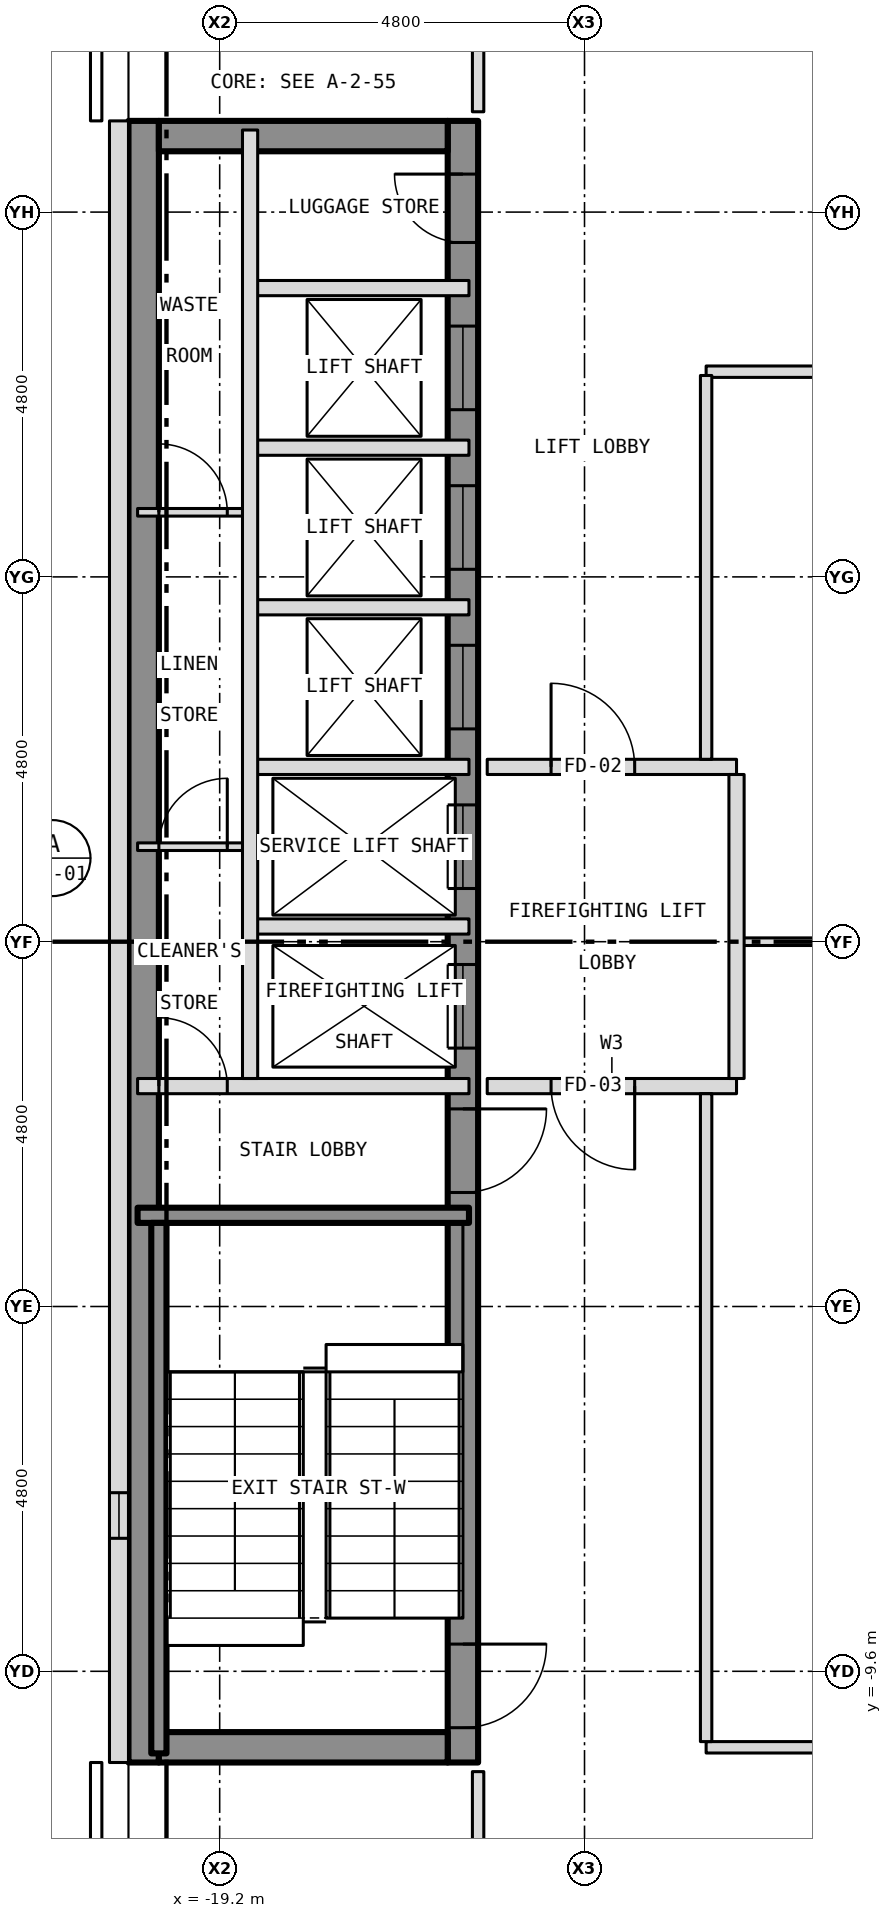
"""IFC4 building model, lengths in metres.
Left out: names, types, materials, properties, quantities, classifications, styles, units other than length and angle.
Written with IfcOpenShell. Run it as: python <this file> out.ifc"""

import sys

from ifc_helpers import new_model, si_unit, direction, frame, frame_2d, origin, place, context, subcontext, project, spatial, rectangle, extrude, element, fill, save


model = new_model("IFC4")
c1 = context("Model", 3, precision=1e-05, world=origin(), true_north=direction((0.0, 1.0)))
c2 = subcontext(c1, "Body", "Model", "MODEL_VIEW")
j1 = project(units=[si_unit("LENGTHUNIT", "METRE"), si_unit("PLANEANGLEUNIT", "RADIAN")], contexts=[c1])
p1 = place(None, origin())
s1 = spatial("IfcSite", under=j1, at=p1, CompositionType="ELEMENT")
p2 = place(p1, origin())
s2 = spatial("IfcBuilding", under=s1, at=p2, CompositionType="ELEMENT")
p3 = place(p2, frame((0.0, 0.0, 201.5)))
s3 = spatial("IfcBuildingStorey", under=s2, at=p3, CompositionType="ELEMENT", Elevation=201.5)
p4 = place(p3, frame((-16.0, -10.8, 0.0), z_axis=(0.0, 0.0, 1.0), x_axis=(0.0, 1.0, 0.0)))
e1 = element("IfcWall", 1, at=p4, inside=s3, PredefinedType="SHEAR", context=c2, shape_type="SweptSolid", body=[
    extrude(rectangle(XDim=21.6, YDim=0.4, at=frame_2d((10.8, 0.0))), origin(), (0.0, 0.0, 1.0), 3.25),
])
p5 = place(p4, frame((9.4, 0.0, 0.0)))
e2 = element("IfcOpeningElement", 2, at=p5, cuts=e1, PredefinedType="OPENING", context=c2, shape_type="SweptSolid", body=[
    extrude(rectangle(XDim=1.1, YDim=2.1, at=frame_2d((0.55, 1.05))), frame((0.0, 0.212, 0.0), z_axis=(0.0, -1.0, 0.0), x_axis=(1.0, 0.0, 0.0)), (0.0, 0.0, 1.0), 0.424),
])
p6 = place(p4, frame((11.5, 0.0, 0.0)))
e3 = element("IfcOpeningElement", 3, at=p6, cuts=e1, PredefinedType="OPENING", context=c2, shape_type="SweptSolid", body=[
    extrude(rectangle(XDim=1.1, YDim=2.1, at=frame_2d((0.55, 1.05))), frame((0.0, 0.212, 0.0), z_axis=(0.0, -1.0, 0.0), x_axis=(1.0, 0.0, 0.0)), (0.0, 0.0, 1.0), 0.424),
])
p7 = place(p4, frame((13.6, 0.0, 0.0)))
e4 = element("IfcOpeningElement", 4, at=p7, cuts=e1, PredefinedType="OPENING", context=c2, shape_type="SweptSolid", body=[
    extrude(rectangle(XDim=1.1, YDim=2.1, at=frame_2d((0.55, 1.05))), frame((0.0, 0.212, 0.0), z_axis=(0.0, -1.0, 0.0), x_axis=(1.0, 0.0, 0.0)), (0.0, 0.0, 1.0), 0.424),
])
p8 = place(p4, frame((15.7, 0.0, 0.0)))
e5 = element("IfcOpeningElement", 5, at=p8, cuts=e1, PredefinedType="OPENING", context=c2, shape_type="SweptSolid", body=[
    extrude(rectangle(XDim=1.1, YDim=2.1, at=frame_2d((0.55, 1.05))), frame((0.0, 0.212, 0.0), z_axis=(0.0, -1.0, 0.0), x_axis=(1.0, 0.0, 0.0)), (0.0, 0.0, 1.0), 0.424),
])
p9 = place(p4, frame((17.8, 0.0, 0.0)))
e6 = element("IfcOpeningElement", 6, at=p9, cuts=e1, PredefinedType="OPENING", context=c2, shape_type="SweptSolid", body=[
    extrude(rectangle(XDim=1.1, YDim=2.1, at=frame_2d((0.55, 1.05))), frame((0.0, 0.212, 0.0), z_axis=(0.0, -1.0, 0.0), x_axis=(1.0, 0.0, 0.0)), (0.0, 0.0, 1.0), 0.424),
])
p10 = place(p4, frame((0.458, 0.0, 0.0)))
e7 = element("IfcOpeningElement", 7, at=p10, cuts=e1, PredefinedType="OPENING", context=c2, shape_type="SweptSolid", body=[
    extrude(rectangle(XDim=1.1, YDim=2.1, at=frame_2d((0.55, 1.05))), frame((0.0, 0.212, 0.0), z_axis=(0.0, -1.0, 0.0), x_axis=(1.0, 0.0, 0.0)), (0.0, 0.0, 1.0), 0.424),
])
p11 = place(p4, frame((7.5, 0.0, 0.0)))
e8 = element("IfcOpeningElement", 8, at=p11, cuts=e1, PredefinedType="OPENING", context=c2, shape_type="SweptSolid", body=[
    extrude(rectangle(XDim=1.1, YDim=2.1, at=frame_2d((0.55, 1.05))), frame((0.0, 0.212, 0.0), z_axis=(0.0, -1.0, 0.0), x_axis=(1.0, 0.0, 0.0)), (0.0, 0.0, 1.0), 0.424),
])
p12 = place(p4, frame((20.0, 0.0, 0.0)))
e9 = element("IfcOpeningElement", 9, at=p12, cuts=e1, PredefinedType="OPENING", context=c2, shape_type="SweptSolid", body=[
    extrude(rectangle(XDim=0.9, YDim=2.1, at=frame_2d((0.45, 1.05))), frame((0.0, 0.212, 0.0), z_axis=(0.0, -1.0, 0.0), x_axis=(1.0, 0.0, 0.0)), (0.0, 0.0, 1.0), 0.424),
])
p13 = place(p3, frame((-20.2, -10.8, 0.0), z_axis=(0.0, 0.0, 1.0), x_axis=(0.0, 1.0, 0.0)))
e10 = element("IfcWall", 10, at=p13, inside=s3, PredefinedType="SHEAR", context=c2, shape_type="SweptSolid", body=[
    extrude(rectangle(XDim=21.6, YDim=0.4, at=frame_2d((10.8, 0.0))), origin(), (0.0, 0.0, 1.0), 3.25),
])
for number, where, z_axis, x_axis in (
    (11, (-20.0, 10.6, 0.0), (0.0, 0.0, 1.0), (1.0, 0.0, 0.0)),
    (12, (-20.0, -10.6, 0.0), (0.0, 0.0, 1.0), (1.0, 0.0, 0.0)),
):
    element("IfcWall", number, at=place(p3, frame(where, z_axis=z_axis, x_axis=x_axis)), inside=s3, PredefinedType="SHEAR", context=c2, shape_type="SweptSolid", body=[
        extrude(rectangle(XDim=3.8, YDim=0.4, at=frame_2d((1.9, 0.0))), origin(), (0.0, 0.0, 1.0), 3.25),
    ])
p14 = place(p3, frame((-20.525, 10.8, 0.0), z_axis=(0.0, 0.0, 1.0), x_axis=(0.0, -1.0, 0.0)))
e13 = element("IfcWall", 13, at=p14, inside=s3, PredefinedType="SOLIDWALL", context=c2, shape_type="SweptSolid", body=[
    extrude(rectangle(XDim=21.6, YDim=0.25, at=frame_2d((10.8, 0.0))), origin(), (0.0, 0.0, 1.0), 3.5),
])
p15 = place(p14, frame((18.05, 0.0, 1.0)))
e14 = element("IfcOpeningElement", 14, at=p15, cuts=e13, PredefinedType="OPENING", context=c2, shape_type="SweptSolid", body=[
    extrude(rectangle(XDim=0.6, YDim=1.5, at=frame_2d((0.3, 0.75))), frame((0.0, 0.137, 0.0), z_axis=(0.0, -1.0, 0.0), x_axis=(1.0, 0.0, 0.0)), (0.0, 0.0, 1.0), 0.274),
])
p16 = place(p3, frame((-12.8, -10.6, 0.0), z_axis=(0.0, 0.0, 1.0), x_axis=(1.0, 0.0, 0.0)))
e15 = element("IfcWall", 15, at=p16, inside=s3, PredefinedType="PARTITIONING", context=c2, shape_type="SweptSolid", body=[
    extrude(rectangle(XDim=16.9, YDim=0.15, at=frame_2d((8.45, 0.0))), origin(), (0.0, 0.0, 1.0), 3.35),
])
p17 = place(p16, frame((5.95, 0.0, 0.0)))
e16 = element("IfcOpeningElement", 16, at=p17, cuts=e15, PredefinedType="OPENING", context=c2, shape_type="SweptSolid", body=[
    extrude(rectangle(XDim=0.9, YDim=2.1, at=frame_2d((0.45, 1.05))), frame((0.0, 0.087, 0.0), z_axis=(0.0, -1.0, 0.0), x_axis=(1.0, 0.0, 0.0)), (0.0, 0.0, 1.0), 0.174),
])
p18 = place(p3, frame((-20.28, -3.6, 0.0), z_axis=(0.0, 0.0, 1.0), x_axis=(1.0, 0.0, 0.0)))
e17 = element("IfcWall", 17, at=p18, inside=s3, PredefinedType="SHEAR", context=c2, shape_type="SweptSolid", body=[
    extrude(rectangle(XDim=4.36, YDim=0.2, at=frame_2d((2.18, 0.0))), origin(), (0.0, 0.0, 1.0), 3.25),
])
p19 = place(p3, frame((-20.28, -1.9, 0.0), z_axis=(0.0, 0.0, 1.0), x_axis=(1.0, 0.0, 0.0)))
e18 = element("IfcWall", 18, at=p19, inside=s3, PredefinedType="PARTITIONING", context=c2, shape_type="SweptSolid", body=[
    extrude(rectangle(XDim=4.36, YDim=0.2, at=frame_2d((2.18, 0.0))), origin(), (0.0, 0.0, 1.0), 3.25),
])
p20 = place(p19, frame((0.28, 0.0, 0.0)))
e19 = element("IfcOpeningElement", 19, at=p20, cuts=e18, PredefinedType="OPENING", context=c2, shape_type="SweptSolid", body=[
    extrude(rectangle(XDim=0.9, YDim=2.1, at=frame_2d((0.45, 1.05))), frame((0.0, 0.112, 0.0), z_axis=(0.0, -1.0, 0.0), x_axis=(1.0, 0.0, 0.0)), (0.0, 0.0, 1.0), 0.224),
])
p21 = place(p3, frame((-15.68, -1.9, 0.0), z_axis=(0.0, 0.0, 1.0), x_axis=(1.0, 0.0, 0.0)))
e20 = element("IfcWall", 20, at=p21, inside=s3, PredefinedType="PARTITIONING", context=c2, shape_type="SweptSolid", body=[
    extrude(rectangle(XDim=3.28, YDim=0.2, at=frame_2d((1.64, 0.0))), origin(), (0.0, 0.0, 1.0), 3.35),
])
p22 = place(p21, frame((0.84, 0.0, 0.0)))
e21 = element("IfcOpeningElement", 21, at=p22, cuts=e20, PredefinedType="OPENING", context=c2, shape_type="SweptSolid", body=[
    extrude(rectangle(XDim=1.1, YDim=2.1, at=frame_2d((0.55, 1.05))), frame((0.0, 0.112, 0.0), z_axis=(0.0, -1.0, 0.0), x_axis=(1.0, 0.0, 0.0)), (0.0, 0.0, 1.0), 0.224),
])
p23 = place(p3, frame((-12.4, 0.0, 0.0), z_axis=(0.0, 0.0, 1.0), x_axis=(1.0, 0.0, 0.0)))
e22 = element("IfcWall", 22, at=p23, inside=s3, PredefinedType="PARTITIONING", context=c2, shape_type="SweptSolid", body=[
    extrude(rectangle(XDim=2.613, YDim=0.1, at=frame_2d((1.306, 0.0))), origin(), (0.0, 0.0, 1.0), 2.728),
])
p24 = place(p3, frame((-18.8, 0.2, 0.0), z_axis=(0.0, 0.0, 1.0), x_axis=(1.0, 0.0, 0.0)))
e23 = element("IfcWall", 23, at=p24, inside=s3, PredefinedType="PARTITIONING", context=c2, shape_type="SweptSolid", body=[
    extrude(rectangle(XDim=2.88, YDim=0.2, at=frame_2d((1.44, 0.0))), origin(), (0.0, 0.0, 1.0), 3.25),
])
p25 = place(p3, frame((-20.28, 1.25, 0.0), z_axis=(0.0, 0.0, 1.0), x_axis=(1.0, 0.0, 0.0)))
e24 = element("IfcWall", 24, at=p25, inside=s3, PredefinedType="PARTITIONING", context=c2, shape_type="SweptSolid", body=[
    extrude(rectangle(XDim=1.48, YDim=0.1, at=frame_2d((0.74, 0.0))), origin(), (0.0, 0.0, 1.0), 3.25),
])
p26 = place(p25, frame((0.28, 0.0, 0.0)))
e25 = element("IfcOpeningElement", 25, at=p26, cuts=e24, PredefinedType="OPENING", context=c2, shape_type="SweptSolid", body=[
    extrude(rectangle(XDim=0.9, YDim=2.1, at=frame_2d((0.45, 1.05))), frame((0.0, 0.062, 0.0), z_axis=(0.0, -1.0, 0.0), x_axis=(1.0, 0.0, 0.0)), (0.0, 0.0, 1.0), 0.124),
])
p27 = place(p3, frame((-18.8, 2.3, 0.0), z_axis=(0.0, 0.0, 1.0), x_axis=(1.0, 0.0, 0.0)))
e26 = element("IfcWall", 26, at=p27, inside=s3, PredefinedType="PARTITIONING", context=c2, shape_type="SweptSolid", body=[
    extrude(rectangle(XDim=2.88, YDim=0.2, at=frame_2d((1.44, 0.0))), origin(), (0.0, 0.0, 1.0), 3.25),
])
p28 = place(p3, frame((-15.68, 2.3, 0.0), z_axis=(0.0, 0.0, 1.0), x_axis=(1.0, 0.0, 0.0)))
e27 = element("IfcWall", 27, at=p28, inside=s3, PredefinedType="PARTITIONING", context=c2, shape_type="SweptSolid", body=[
    extrude(rectangle(XDim=3.28, YDim=0.2, at=frame_2d((1.64, 0.0))), origin(), (0.0, 0.0, 1.0), 3.35),
])
p29 = place(p28, frame((0.84, 0.0, 0.0)))
e28 = element("IfcOpeningElement", 28, at=p29, cuts=e27, PredefinedType="OPENING", context=c2, shape_type="SweptSolid", body=[
    extrude(rectangle(XDim=1.1, YDim=2.1, at=frame_2d((0.55, 1.05))), frame((0.0, 0.112, 0.0), z_axis=(0.0, -1.0, 0.0), x_axis=(1.0, 0.0, 0.0)), (0.0, 0.0, 1.0), 0.224),
])
p30 = place(p3, frame((-18.8, 4.4, 0.0), z_axis=(0.0, 0.0, 1.0), x_axis=(1.0, 0.0, 0.0)))
e29 = element("IfcWall", 29, at=p30, inside=s3, PredefinedType="PARTITIONING", context=c2, shape_type="SweptSolid", body=[
    extrude(rectangle(XDim=2.88, YDim=0.2, at=frame_2d((1.44, 0.0))), origin(), (0.0, 0.0, 1.0), 3.25),
])
p31 = place(p3, frame((-20.28, 5.65, 0.0), z_axis=(0.0, 0.0, 1.0), x_axis=(1.0, 0.0, 0.0)))
e30 = element("IfcWall", 30, at=p31, inside=s3, PredefinedType="PARTITIONING", context=c2, shape_type="SweptSolid", body=[
    extrude(rectangle(XDim=1.48, YDim=0.1, at=frame_2d((0.74, 0.0))), origin(), (0.0, 0.0, 1.0), 3.25),
])
p32 = place(p31, frame((0.28, 0.0, 0.0)))
e31 = element("IfcOpeningElement", 31, at=p32, cuts=e30, PredefinedType="OPENING", context=c2, shape_type="SweptSolid", body=[
    extrude(rectangle(XDim=0.9, YDim=2.1, at=frame_2d((0.45, 1.05))), frame((0.0, 0.062, 0.0), z_axis=(0.0, -1.0, 0.0), x_axis=(1.0, 0.0, 0.0)), (0.0, 0.0, 1.0), 0.124),
])
p33 = place(p3, frame((-18.8, 6.5, 0.0), z_axis=(0.0, 0.0, 1.0), x_axis=(1.0, 0.0, 0.0)))
e32 = element("IfcWall", 32, at=p33, inside=s3, PredefinedType="PARTITIONING", context=c2, shape_type="SweptSolid", body=[
    extrude(rectangle(XDim=2.88, YDim=0.2, at=frame_2d((1.44, 0.0))), origin(), (0.0, 0.0, 1.0), 3.25),
])
p34 = place(p3, frame((-12.8, 7.5, 0.0), z_axis=(0.0, 0.0, 1.0), x_axis=(1.0, 0.0, 0.0)))
e33 = element("IfcWall", 33, at=p34, inside=s3, PredefinedType="PARTITIONING", context=c2, shape_type="SweptSolid", body=[
    extrude(rectangle(XDim=16.9, YDim=0.15, at=frame_2d((8.45, 0.0))), origin(), (0.0, 0.0, 1.0), 3.35),
])
p35 = place(p34, frame((14.4, 0.0, 0.0)))
e34 = element("IfcOpeningElement", 34, at=p35, cuts=e33, PredefinedType="OPENING", context=c2, shape_type="SweptSolid", body=[
    extrude(rectangle(XDim=0.9, YDim=2.1, at=frame_2d((0.45, 1.05))), frame((0.0, 0.087, 0.0), z_axis=(0.0, -1.0, 0.0), x_axis=(1.0, 0.0, 0.0)), (0.0, 0.0, 1.0), 0.174),
])
p36 = place(p34, frame((5.95, 0.0, 0.0)))
e35 = element("IfcOpeningElement", 35, at=p36, cuts=e33, PredefinedType="OPENING", context=c2, shape_type="SweptSolid", body=[
    extrude(rectangle(XDim=0.9, YDim=2.1, at=frame_2d((0.45, 1.05))), frame((0.0, 0.087, 0.0), z_axis=(0.0, -1.0, 0.0), x_axis=(1.0, 0.0, 0.0)), (0.0, 0.0, 1.0), 0.174),
])
p37 = place(p3, frame((-18.8, 8.6, 0.0), z_axis=(0.0, 0.0, 1.0), x_axis=(1.0, 0.0, 0.0)))
e36 = element("IfcWall", 36, at=p37, inside=s3, PredefinedType="PARTITIONING", context=c2, shape_type="SweptSolid", body=[
    extrude(rectangle(XDim=2.88, YDim=0.2, at=frame_2d((1.44, 0.0))), origin(), (0.0, 0.0, 1.0), 3.25),
])
p38 = place(p3, frame((-20.0, -10.68, 0.0), z_axis=(0.0, 0.0, 1.0), x_axis=(0.0, 1.0, 0.0)))
e37 = element("IfcWall", 37, at=p38, inside=s3, PredefinedType="SHEAR", context=c2, shape_type="SweptSolid", body=[
    extrude(rectangle(XDim=6.98, YDim=0.2, at=frame_2d((3.49, 0.0))), origin(), (0.0, 0.0, 1.0), 3.25),
])
p39 = place(p3, frame((-18.8, -1.8, 0.0), z_axis=(0.0, 0.0, 1.0), x_axis=(0.0, 1.0, 0.0)))
e38 = element("IfcWall", 38, at=p39, inside=s3, PredefinedType="PARTITIONING", context=c2, shape_type="SweptSolid", body=[
    extrude(rectangle(XDim=12.48, YDim=0.2, at=frame_2d((6.24, 0.0))), origin(), (0.0, 0.0, 1.0), 3.25),
])
for number, where, z_axis, x_axis in (
    (39, (-15.8, -12.725, 0.0), (0.0, 0.0, 1.0), (0.0, 1.0, 0.0)),
    (40, (-15.8, 10.92, 0.0), (0.0, 0.0, 1.0), (0.0, 1.0, 0.0)),
):
    element("IfcWall", number, at=place(p3, frame(where, z_axis=z_axis, x_axis=x_axis)), inside=s3, PredefinedType="PARTITIONING", context=c2, shape_type="SweptSolid", body=[
        extrude(rectangle(XDim=1.805, YDim=0.15, at=frame_2d((0.903, 0.0))), origin(), (0.0, 0.0, 1.0), 3.35),
    ])
p40 = place(p3, frame((-12.8, -10.525, 0.0), z_axis=(0.0, 0.0, 1.0), x_axis=(0.0, 1.0, 0.0)))
e41 = element("IfcWall", 41, at=p40, inside=s3, PredefinedType="PARTITIONING", context=c2, shape_type="SweptSolid", body=[
    extrude(rectangle(XDim=8.525, YDim=0.15, at=frame_2d((4.262, 0.0))), origin(), (0.0, 0.0, 1.0), 3.35),
])
p41 = place(p3, frame((-12.8, 2.4, 0.0), z_axis=(0.0, 0.0, 1.0), x_axis=(0.0, 1.0, 0.0)))
e42 = element("IfcWall", 42, at=p41, inside=s3, PredefinedType="PARTITIONING", context=c2, shape_type="SweptSolid", body=[
    extrude(rectangle(XDim=5.05, YDim=0.15, at=frame_2d((2.525, 0.0))), origin(), (0.0, 0.0, 1.0), 3.35),
])
p42 = place(p3, frame((-12.4, -1.8, 0.0), z_axis=(0.0, 0.0, 1.0), x_axis=(0.0, 1.0, 0.0)))
e43 = element("IfcWall", 43, at=p42, inside=s3, PredefinedType="PARTITIONING", context=c2, shape_type="SweptSolid", body=[
    extrude(rectangle(XDim=4.0, YDim=0.2, at=frame_2d((2.0, 0.0))), origin(), (0.0, 0.0, 1.0), 3.35),
])
p43 = place(p15, origin())
e44 = element("IfcWindow", 44, at=p43, inside=s3, PartitioningType="SINGLE_PANEL", PredefinedType="WINDOW", context=c2, shape_type="SweptSolid", body=[
    extrude(rectangle(XDim=0.6, YDim=1.5, at=frame_2d((0.3, 0.75))), frame((0.0, -0.035, 0.0), z_axis=(0.0, -1.0, 0.0), x_axis=(1.0, 0.0, 0.0)), (0.0, 0.0, 1.0), 0.06),
])
fill(e14, e44)
p44 = place(p5, origin())
e45 = element("IfcDoor", 45, at=p44, inside=s3, OperationType="SLIDING_TO_LEFT", PredefinedType="DOOR", context=c2, shape_type="SweptSolid", body=[
    extrude(rectangle(XDim=1.1, YDim=2.1, at=frame_2d((0.55, 1.05))), frame((0.0, 0.025, 0.0), z_axis=(0.0, -1.0, 0.0), x_axis=(1.0, 0.0, 0.0)), (0.0, 0.0, 1.0), 0.05),
])
fill(e2, e45)
p45 = place(p6, origin())
e46 = element("IfcDoor", 46, at=p45, inside=s3, OperationType="SLIDING_TO_LEFT", PredefinedType="DOOR", context=c2, shape_type="SweptSolid", body=[
    extrude(rectangle(XDim=1.1, YDim=2.1, at=frame_2d((0.55, 1.05))), frame((0.0, 0.025, 0.0), z_axis=(0.0, -1.0, 0.0), x_axis=(1.0, 0.0, 0.0)), (0.0, 0.0, 1.0), 0.05),
])
fill(e3, e46)
p46 = place(p7, origin())
e47 = element("IfcDoor", 47, at=p46, inside=s3, OperationType="SLIDING_TO_LEFT", PredefinedType="DOOR", context=c2, shape_type="SweptSolid", body=[
    extrude(rectangle(XDim=1.1, YDim=2.1, at=frame_2d((0.55, 1.05))), frame((0.0, 0.025, 0.0), z_axis=(0.0, -1.0, 0.0), x_axis=(1.0, 0.0, 0.0)), (0.0, 0.0, 1.0), 0.05),
])
fill(e4, e47)
p47 = place(p8, origin())
e48 = element("IfcDoor", 48, at=p47, inside=s3, OperationType="SLIDING_TO_LEFT", PredefinedType="DOOR", context=c2, shape_type="SweptSolid", body=[
    extrude(rectangle(XDim=1.1, YDim=2.1, at=frame_2d((0.55, 1.05))), frame((0.0, 0.025, 0.0), z_axis=(0.0, -1.0, 0.0), x_axis=(1.0, 0.0, 0.0)), (0.0, 0.0, 1.0), 0.05),
])
fill(e5, e48)
p48 = place(p9, origin())
e49 = element("IfcDoor", 49, at=p48, inside=s3, OperationType="SLIDING_TO_LEFT", PredefinedType="DOOR", context=c2, shape_type="SweptSolid", body=[
    extrude(rectangle(XDim=1.1, YDim=2.1, at=frame_2d((0.55, 1.05))), frame((0.0, 0.025, 0.0), z_axis=(0.0, -1.0, 0.0), x_axis=(1.0, 0.0, 0.0)), (0.0, 0.0, 1.0), 0.05),
])
fill(e6, e49)
p49 = place(p10, origin())
e50 = element("IfcDoor", 50, at=p49, inside=s3, OperationType="SINGLE_SWING_RIGHT", PredefinedType="DOOR", context=c2, shape_type="SweptSolid", body=[
    extrude(rectangle(XDim=1.1, YDim=2.1, at=frame_2d((0.55, 1.05))), frame((0.0, 0.025, 0.0), z_axis=(0.0, -1.0, 0.0), x_axis=(1.0, 0.0, 0.0)), (0.0, 0.0, 1.0), 0.05),
])
fill(e7, e50)
p50 = place(p11, origin())
e51 = element("IfcDoor", 51, at=p50, inside=s3, OperationType="SINGLE_SWING_RIGHT", PredefinedType="DOOR", context=c2, shape_type="SweptSolid", body=[
    extrude(rectangle(XDim=1.1, YDim=2.1, at=frame_2d((0.55, 1.05))), frame((0.0, 0.025, 0.0), z_axis=(0.0, -1.0, 0.0), x_axis=(1.0, 0.0, 0.0)), (0.0, 0.0, 1.0), 0.05),
])
fill(e8, e51)
p51 = place(p12, origin())
e52 = element("IfcDoor", 52, at=p51, inside=s3, OperationType="SINGLE_SWING_RIGHT", PredefinedType="DOOR", context=c2, shape_type="SweptSolid", body=[
    extrude(rectangle(XDim=0.9, YDim=2.1, at=frame_2d((0.45, 1.05))), frame((0.0, 0.025, 0.0), z_axis=(0.0, -1.0, 0.0), x_axis=(1.0, 0.0, 0.0)), (0.0, 0.0, 1.0), 0.05),
])
fill(e9, e52)
p52 = place(p20, origin())
e53 = element("IfcDoor", 53, at=p52, inside=s3, OperationType="SINGLE_SWING_LEFT", PredefinedType="DOOR", context=c2, shape_type="SweptSolid", body=[
    extrude(rectangle(XDim=0.9, YDim=2.1, at=frame_2d((0.45, 1.05))), frame((0.0, 0.025, 0.0), z_axis=(0.0, -1.0, 0.0), x_axis=(1.0, 0.0, 0.0)), (0.0, 0.0, 1.0), 0.05),
])
fill(e19, e53)
p53 = place(p26, origin())
e54 = element("IfcDoor", 54, at=p53, inside=s3, OperationType="SINGLE_SWING_RIGHT", PredefinedType="DOOR", context=c2, shape_type="SweptSolid", body=[
    extrude(rectangle(XDim=0.9, YDim=2.1, at=frame_2d((0.45, 1.05))), frame((0.0, 0.025, 0.0), z_axis=(0.0, -1.0, 0.0), x_axis=(1.0, 0.0, 0.0)), (0.0, 0.0, 1.0), 0.05),
])
fill(e25, e54)
p54 = place(p32, origin())
e55 = element("IfcDoor", 55, at=p54, inside=s3, OperationType="SINGLE_SWING_LEFT", PredefinedType="DOOR", context=c2, shape_type="SweptSolid", body=[
    extrude(rectangle(XDim=0.9, YDim=2.1, at=frame_2d((0.45, 1.05))), frame((0.0, 0.025, 0.0), z_axis=(0.0, -1.0, 0.0), x_axis=(1.0, 0.0, 0.0)), (0.0, 0.0, 1.0), 0.05),
])
fill(e31, e55)
p55 = place(p29, origin())
e56 = element("IfcDoor", 56, at=p55, inside=s3, OperationType="SINGLE_SWING_LEFT", PredefinedType="DOOR", context=c2, shape_type="SweptSolid", body=[
    extrude(rectangle(XDim=1.1, YDim=2.1, at=frame_2d((0.55, 1.05))), frame((0.0, 0.025, 0.0), z_axis=(0.0, -1.0, 0.0), x_axis=(1.0, 0.0, 0.0)), (0.0, 0.0, 1.0), 0.05),
])
fill(e28, e56)
p56 = place(p22, origin())
e57 = element("IfcDoor", 57, at=p56, inside=s3, OperationType="SINGLE_SWING_RIGHT", PredefinedType="DOOR", context=c2, shape_type="SweptSolid", body=[
    extrude(rectangle(XDim=1.1, YDim=2.1, at=frame_2d((0.55, 1.05))), frame((0.0, 0.025, 0.0), z_axis=(0.0, -1.0, 0.0), x_axis=(1.0, 0.0, 0.0)), (0.0, 0.0, 1.0), 0.05),
])
fill(e21, e57)
save(model, sys.argv[1])
